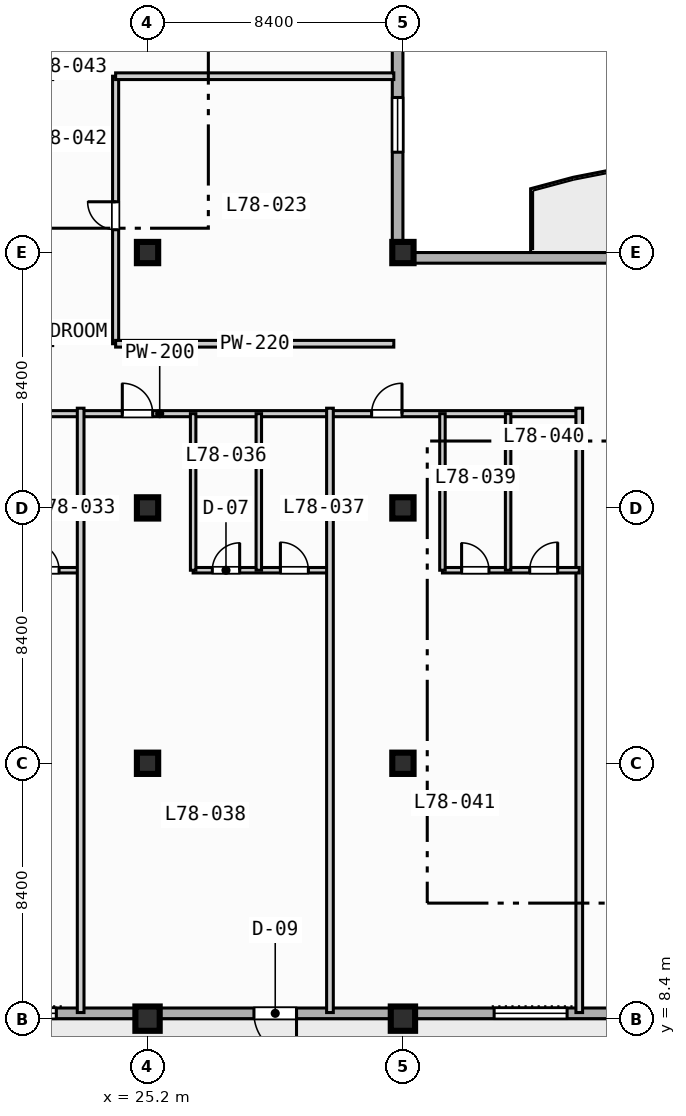
"""IFC4 building model, lengths in metres.
Left out: names, types, materials, properties, quantities, classifications, styles, units other than length and angle.
Written with IfcOpenShell. Run it as: python <this file> out.ifc"""

import sys

from ifc_helpers import new_model, si_unit, direction, frame, frame_2d, origin, origin_2d, place, context, subcontext, project, spatial, rectangle, extrude, element, fill, save


model = new_model("IFC4")
c1 = context("Model", 3, precision=1e-05, world=origin(), true_north=direction((0.0, 1.0)))
c2 = subcontext(c1, "Body", "Model", "MODEL_VIEW")
j1 = project(units=[si_unit("LENGTHUNIT", "METRE"), si_unit("PLANEANGLEUNIT", "RADIAN")], contexts=[c1])
p1 = place(None, origin())
s1 = spatial("IfcSite", under=j1, at=p1, CompositionType="ELEMENT")
p2 = place(p1, origin())
s2 = spatial("IfcBuilding", under=s1, at=p2, CompositionType="ELEMENT")
p3 = place(p2, frame((0.0, 0.0, 316.4)))
s3 = spatial("IfcBuildingStorey", under=s2, at=p3, CompositionType="ELEMENT", Elevation=316.4)
p4 = place(p3, frame((25.2, 8.4, 0.0), z_axis=(0.0, 0.0, 1.0), x_axis=(1.0, 0.0, 0.0)))
e1 = element("IfcColumn", 1, at=p4, inside=s3, PredefinedType="COLUMN", context=c2, shape_type="SweptSolid", body=[
    extrude(rectangle(XDim=0.8, YDim=0.8, at=origin_2d()), origin(), (0.0, 0.0, 1.0), 3.9),
])
for number, where, z_axis, x_axis in (
    (2, (25.2, 16.8, 0.0), (0.0, 0.0, 1.0), (1.0, 0.0, 0.0)),
    (3, (25.2, 25.2, 0.0), (0.0, 0.0, 1.0), (1.0, 0.0, 0.0)),
    (4, (25.2, 33.6, 0.0), (0.0, 0.0, 1.0), (1.0, 0.0, 0.0)),
):
    element("IfcColumn", number, at=place(p3, frame(where, z_axis=z_axis, x_axis=x_axis)), inside=s3, PredefinedType="COLUMN", context=c2, shape_type="SweptSolid", body=[
        extrude(rectangle(XDim=0.7, YDim=0.7, at=origin_2d()), origin(), (0.0, 0.0, 1.0), 3.9),
    ])
p5 = place(p3, frame((33.6, 8.4, 0.0), z_axis=(0.0, 0.0, 1.0), x_axis=(1.0, 0.0, 0.0)))
e5 = element("IfcColumn", 5, at=p5, inside=s3, PredefinedType="COLUMN", context=c2, shape_type="SweptSolid", body=[
    extrude(rectangle(XDim=0.8, YDim=0.8, at=origin_2d()), origin(), (0.0, 0.0, 1.0), 3.9),
])
for number, where, z_axis, x_axis in (
    (6, (33.6, 16.8, 0.0), (0.0, 0.0, 1.0), (1.0, 0.0, 0.0)),
    (7, (33.6, 25.2, 0.0), (0.0, 0.0, 1.0), (1.0, 0.0, 0.0)),
    (8, (33.6, 33.6, 0.0), (0.0, 0.0, 1.0), (1.0, 0.0, 0.0)),
):
    element("IfcColumn", number, at=place(p3, frame(where, z_axis=z_axis, x_axis=x_axis)), inside=s3, PredefinedType="COLUMN", context=c2, shape_type="SweptSolid", body=[
        extrude(rectangle(XDim=0.7, YDim=0.7, at=origin_2d()), origin(), (0.0, 0.0, 1.0), 3.9),
    ])
p6 = place(p3, frame((33.425, 72.425, 0.0), z_axis=(0.0, 0.0, 1.0), x_axis=(0.0, -1.0, 0.0)))
e9 = element("IfcWall", 9, at=p6, inside=s3, PredefinedType="STANDARD", context=c2, shape_type="SweptSolid", body=[
    extrude(rectangle(XDim=39.0, YDim=0.35, at=frame_2d((19.5, 0.0))), origin(), (0.0, 0.0, 1.0), 3.67),
])
p7 = place(p6, frame((33.725, 0.0, 0.85)))
e10 = element("IfcOpeningElement", 10, at=p7, cuts=e9, PredefinedType="OPENING", context=c2, shape_type="SweptSolid", body=[
    extrude(rectangle(XDim=1.8, YDim=1.8, at=frame_2d((0.9, 0.9))), frame((0.0, 0.185, 0.0), z_axis=(0.0, -1.0, 0.0), x_axis=(1.0, 0.0, 0.0)), (0.0, 0.0, 1.0), 0.37),
])
p8 = place(p6, frame((8.225, 0.0, 0.85)))
e11 = element("IfcOpeningElement", 11, at=p8, cuts=e9, PredefinedType="OPENING", context=c2, shape_type="SweptSolid", body=[
    extrude(rectangle(XDim=2.4, YDim=1.95, at=frame_2d((1.2, 0.975))), frame((0.0, 0.185, 0.0), z_axis=(0.0, -1.0, 0.0), x_axis=(1.0, 0.0, 0.0)), (0.0, 0.0, 1.0), 0.37),
])
p9 = place(p3, frame((33.425, 33.425, 0.0), z_axis=(0.0, 0.0, 1.0), x_axis=(1.0, 0.0, 0.0)))
e12 = element("IfcWall", 12, at=p9, inside=s3, PredefinedType="STANDARD", context=c2, shape_type="SweptSolid", body=[
    extrude(rectangle(XDim=30.6, YDim=0.35, at=frame_2d((15.3, 0.0))), origin(), (0.0, 0.0, 1.0), 3.67),
])
p10 = place(p9, frame((12.075, 0.0, 0.0)))
e13 = element("IfcOpeningElement", 13, at=p10, cuts=e12, PredefinedType="OPENING", context=c2, shape_type="SweptSolid", body=[
    extrude(rectangle(XDim=1.4, YDim=2.2, at=frame_2d((0.7, 1.1))), frame((0.0, 0.185, 0.0), z_axis=(0.0, -1.0, 0.0), x_axis=(1.0, 0.0, 0.0)), (0.0, 0.0, 1.0), 0.37),
])
p11 = place(p3, frame((64.025, 8.575, 0.0), z_axis=(0.0, 0.0, 1.0), x_axis=(-1.0, 0.0, 0.0)))
e14 = element("IfcWall", 14, at=p11, inside=s3, PredefinedType="STANDARD", context=c2, shape_type="SweptSolid", body=[
    extrude(rectangle(XDim=52.45, YDim=0.35, at=frame_2d((26.225, 0.0))), origin(), (0.0, 0.0, 1.0), 3.67),
])
p12 = place(p11, frame((33.925, 0.0, 0.0)))
e15 = element("IfcOpeningElement", 15, at=p12, cuts=e14, PredefinedType="OPENING", context=c2, shape_type="SweptSolid", body=[
    extrude(rectangle(XDim=1.4, YDim=2.2, at=frame_2d((0.7, 1.1))), frame((0.0, 0.185, 0.0), z_axis=(0.0, -1.0, 0.0), x_axis=(1.0, 0.0, 0.0)), (0.0, 0.0, 1.0), 0.37),
])
p13 = place(p11, frame((41.825, 0.0, 0.85)))
e16 = element("IfcOpeningElement", 16, at=p13, cuts=e14, PredefinedType="OPENING", context=c2, shape_type="SweptSolid", body=[
    extrude(rectangle(XDim=2.4, YDim=1.95, at=frame_2d((1.2, 0.975))), frame((0.0, 0.185, 0.0), z_axis=(0.0, -1.0, 0.0), x_axis=(1.0, 0.0, 0.0)), (0.0, 0.0, 1.0), 0.37),
])
p14 = place(p11, frame((25.025, 0.0, 0.85)))
e17 = element("IfcOpeningElement", 17, at=p14, cuts=e14, PredefinedType="OPENING", context=c2, shape_type="SweptSolid", body=[
    extrude(rectangle(XDim=2.4, YDim=1.95, at=frame_2d((1.2, 0.975))), frame((0.0, 0.185, 0.0), z_axis=(0.0, -1.0, 0.0), x_axis=(1.0, 0.0, 0.0)), (0.0, 0.0, 1.0), 0.37),
])
p15 = place(p11, frame((16.925, 0.0, 0.85)))
e18 = element("IfcOpeningElement", 18, at=p15, cuts=e14, PredefinedType="OPENING", context=c2, shape_type="SweptSolid", body=[
    extrude(rectangle(XDim=1.8, YDim=1.8, at=frame_2d((0.9, 0.9))), frame((0.0, 0.185, 0.0), z_axis=(0.0, -1.0, 0.0), x_axis=(1.0, 0.0, 0.0)), (0.0, 0.0, 1.0), 0.37),
])
p16 = place(p11, frame((50.275, 0.0, 0.85)))
e19 = element("IfcOpeningElement", 19, at=p16, cuts=e14, PredefinedType="OPENING", context=c2, shape_type="SweptSolid", body=[
    extrude(rectangle(XDim=1.8, YDim=1.8, at=frame_2d((0.9, 0.9))), frame((0.0, 0.185, 0.0), z_axis=(0.0, -1.0, 0.0), x_axis=(1.0, 0.0, 0.0)), (0.0, 0.0, 1.0), 0.37),
])
p17 = place(p3, frame((24.15, 30.6, 0.0), z_axis=(0.0, 0.0, 1.0), x_axis=(0.0, 1.0, 0.0)))
e20 = element("IfcWall", 20, at=p17, inside=s3, PredefinedType="PARTITIONING", context=c2, shape_type="SweptSolid", body=[
    extrude(rectangle(XDim=8.8, YDim=0.2, at=frame_2d((4.4, 0.0))), origin(), (0.0, 0.0, 1.0), 3.67),
])
p18 = place(p17, frame((3.75, 0.0, 0.0)))
e21 = element("IfcOpeningElement", 21, at=p18, cuts=e20, PredefinedType="OPENING", context=c2, shape_type="SweptSolid", body=[
    extrude(rectangle(XDim=0.92, YDim=2.1, at=frame_2d((0.46, 1.05))), frame((0.0, 0.11, 0.0), z_axis=(0.0, -1.0, 0.0), x_axis=(1.0, 0.0, 0.0)), (0.0, 0.0, 1.0), 0.22),
])
for number, where, z_axis, x_axis in (
    (22, (24.15, 30.6, 0.0), (0.0, 0.0, 1.0), (1.0, 0.0, 0.0)),
    (23, (24.15, 39.4, 0.0), (0.0, 0.0, 1.0), (1.0, 0.0, 0.0)),
):
    element("IfcWall", number, at=place(p3, frame(where, z_axis=z_axis, x_axis=x_axis)), inside=s3, PredefinedType="PARTITIONING", context=c2, shape_type="SweptSolid", body=[
        extrude(rectangle(XDim=9.15, YDim=0.22, at=frame_2d((4.575, 0.0))), origin(), (0.0, 0.0, 1.0), 3.67),
    ])
p19 = place(p3, frame((11.8, 28.3, 0.0), z_axis=(0.0, 0.0, 1.0), x_axis=(1.0, 0.0, 0.0)))
e24 = element("IfcWall", 24, at=p19, inside=s3, PredefinedType="PARTITIONING", context=c2, shape_type="SweptSolid", body=[
    extrude(rectangle(XDim=27.6, YDim=0.2, at=frame_2d((13.8, 0.0))), origin(), (0.0, 0.0, 1.0), 3.67),
])
p20 = place(p19, frame((3.92, 0.0, 0.0)))
e25 = element("IfcOpeningElement", 25, at=p20, cuts=e24, PredefinedType="OPENING", context=c2, shape_type="SweptSolid", body=[
    extrude(rectangle(XDim=1.0, YDim=2.15, at=frame_2d((0.5, 1.075))), frame((0.0, 0.11, 0.0), z_axis=(0.0, -1.0, 0.0), x_axis=(1.0, 0.0, 0.0)), (0.0, 0.0, 1.0), 0.22),
])
p21 = place(p19, frame((12.57, 0.0, 0.0)))
e26 = element("IfcOpeningElement", 26, at=p21, cuts=e24, PredefinedType="OPENING", context=c2, shape_type="SweptSolid", body=[
    extrude(rectangle(XDim=1.0, YDim=2.15, at=frame_2d((0.5, 1.075))), frame((0.0, 0.11, 0.0), z_axis=(0.0, -1.0, 0.0), x_axis=(1.0, 0.0, 0.0)), (0.0, 0.0, 1.0), 0.22),
])
p22 = place(p19, frame((20.77, 0.0, 0.0)))
e27 = element("IfcOpeningElement", 27, at=p22, cuts=e24, PredefinedType="OPENING", context=c2, shape_type="SweptSolid", body=[
    extrude(rectangle(XDim=1.0, YDim=2.15, at=frame_2d((0.5, 1.075))), frame((0.0, 0.11, 0.0), z_axis=(0.0, -1.0, 0.0), x_axis=(1.0, 0.0, 0.0)), (0.0, 0.0, 1.0), 0.22),
])
p23 = place(p3, frame((18.5, 23.15, 0.0), z_axis=(0.0, 0.0, 1.0), x_axis=(1.0, 0.0, 0.0)))
e28 = element("IfcWall", 28, at=p23, inside=s3, PredefinedType="PLUMBINGWALL", context=c2, shape_type="SweptSolid", body=[
    extrude(rectangle(XDim=4.5, YDim=0.18, at=frame_2d((2.25, 0.0))), origin(), (0.0, 0.0, 1.0), 3.67),
])
p24 = place(p23, frame((0.63, 0.0, 0.0)))
e29 = element("IfcOpeningElement", 29, at=p24, cuts=e28, PredefinedType="OPENING", context=c2, shape_type="SweptSolid", body=[
    extrude(rectangle(XDim=0.9, YDim=2.1, at=frame_2d((0.45, 1.05))), frame((0.0, 0.1, 0.0), z_axis=(0.0, -1.0, 0.0), x_axis=(1.0, 0.0, 0.0)), (0.0, 0.0, 1.0), 0.2),
])
p25 = place(p23, frame((2.87, 0.0, 0.0)))
e30 = element("IfcOpeningElement", 30, at=p25, cuts=e28, PredefinedType="OPENING", context=c2, shape_type="SweptSolid", body=[
    extrude(rectangle(XDim=0.92, YDim=2.1, at=frame_2d((0.46, 1.05))), frame((0.0, 0.1, 0.0), z_axis=(0.0, -1.0, 0.0), x_axis=(1.0, 0.0, 0.0)), (0.0, 0.0, 1.0), 0.2),
])
p26 = place(p3, frame((23.0, 8.6, 0.0), z_axis=(0.0, 0.0, 1.0), x_axis=(0.0, 1.0, 0.0)))
e31 = element("IfcWall", 31, at=p26, inside=s3, PredefinedType="PARTITIONING", context=c2, shape_type="SweptSolid", body=[
    extrude(rectangle(XDim=19.88, YDim=0.22, at=frame_2d((9.94, 0.0))), origin(), (0.0, 0.0, 1.0), 3.67),
])
p27 = place(p3, frame((26.7, 23.15, 0.0), z_axis=(0.0, 0.0, 1.0), x_axis=(1.0, 0.0, 0.0)))
e32 = element("IfcWall", 32, at=p27, inside=s3, PredefinedType="PLUMBINGWALL", context=c2, shape_type="SweptSolid", body=[
    extrude(rectangle(XDim=4.5, YDim=0.18, at=frame_2d((2.25, 0.0))), origin(), (0.0, 0.0, 1.0), 3.67),
])
p28 = place(p27, frame((0.63, 0.0, 0.0)))
e33 = element("IfcOpeningElement", 33, at=p28, cuts=e32, PredefinedType="OPENING", context=c2, shape_type="SweptSolid", body=[
    extrude(rectangle(XDim=0.9, YDim=2.1, at=frame_2d((0.45, 1.05))), frame((0.0, 0.1, 0.0), z_axis=(0.0, -1.0, 0.0), x_axis=(1.0, 0.0, 0.0)), (0.0, 0.0, 1.0), 0.2),
])
p29 = place(p27, frame((2.87, 0.0, 0.0)))
e34 = element("IfcOpeningElement", 34, at=p29, cuts=e32, PredefinedType="OPENING", context=c2, shape_type="SweptSolid", body=[
    extrude(rectangle(XDim=0.92, YDim=2.1, at=frame_2d((0.46, 1.05))), frame((0.0, 0.1, 0.0), z_axis=(0.0, -1.0, 0.0), x_axis=(1.0, 0.0, 0.0)), (0.0, 0.0, 1.0), 0.2),
])
for number, where, z_axis, x_axis in (
    (35, (26.7, 23.15, 0.0), (0.0, 0.0, 1.0), (0.0, 1.0, 0.0)),
    (36, (28.86, 23.15, 0.0), (0.0, 0.0, 1.0), (0.0, 1.0, 0.0)),
):
    element("IfcWall", number, at=place(p3, frame(where, z_axis=z_axis, x_axis=x_axis)), inside=s3, PredefinedType="PLUMBINGWALL", context=c2, shape_type="SweptSolid", body=[
        extrude(rectangle(XDim=5.15, YDim=0.18, at=frame_2d((2.575, 0.0))), origin(), (0.0, 0.0, 1.0), 3.67),
    ])
for number, where, z_axis, x_axis in (
    (37, (31.2, 8.6, 0.0), (0.0, 0.0, 1.0), (0.0, 1.0, 0.0)),
    (38, (39.4, 8.6, 0.0), (0.0, 0.0, 1.0), (0.0, 1.0, 0.0)),
):
    element("IfcWall", number, at=place(p3, frame(where, z_axis=z_axis, x_axis=x_axis)), inside=s3, PredefinedType="PARTITIONING", context=c2, shape_type="SweptSolid", body=[
        extrude(rectangle(XDim=19.88, YDim=0.22, at=frame_2d((9.94, 0.0))), origin(), (0.0, 0.0, 1.0), 3.67),
    ])
p30 = place(p3, frame((34.9, 23.15, 0.0), z_axis=(0.0, 0.0, 1.0), x_axis=(1.0, 0.0, 0.0)))
e39 = element("IfcWall", 39, at=p30, inside=s3, PredefinedType="PLUMBINGWALL", context=c2, shape_type="SweptSolid", body=[
    extrude(rectangle(XDim=4.5, YDim=0.18, at=frame_2d((2.25, 0.0))), origin(), (0.0, 0.0, 1.0), 3.67),
])
p31 = place(p30, frame((0.63, 0.0, 0.0)))
e40 = element("IfcOpeningElement", 40, at=p31, cuts=e39, PredefinedType="OPENING", context=c2, shape_type="SweptSolid", body=[
    extrude(rectangle(XDim=0.9, YDim=2.1, at=frame_2d((0.45, 1.05))), frame((0.0, 0.1, 0.0), z_axis=(0.0, -1.0, 0.0), x_axis=(1.0, 0.0, 0.0)), (0.0, 0.0, 1.0), 0.2),
])
p32 = place(p30, frame((2.87, 0.0, 0.0)))
e41 = element("IfcOpeningElement", 41, at=p32, cuts=e39, PredefinedType="OPENING", context=c2, shape_type="SweptSolid", body=[
    extrude(rectangle(XDim=0.92, YDim=2.1, at=frame_2d((0.46, 1.05))), frame((0.0, 0.1, 0.0), z_axis=(0.0, -1.0, 0.0), x_axis=(1.0, 0.0, 0.0)), (0.0, 0.0, 1.0), 0.2),
])
for number, where, z_axis, x_axis in (
    (42, (34.9, 23.15, 0.0), (0.0, 0.0, 1.0), (0.0, 1.0, 0.0)),
    (43, (37.06, 23.15, 0.0), (0.0, 0.0, 1.0), (0.0, 1.0, 0.0)),
):
    element("IfcWall", number, at=place(p3, frame(where, z_axis=z_axis, x_axis=x_axis)), inside=s3, PredefinedType="PLUMBINGWALL", context=c2, shape_type="SweptSolid", body=[
        extrude(rectangle(XDim=5.15, YDim=0.18, at=frame_2d((2.575, 0.0))), origin(), (0.0, 0.0, 1.0), 3.67),
    ])
p33 = place(p7, origin())
e44 = element("IfcWindow", 44, at=p33, inside=s3, PartitioningType="SINGLE_PANEL", PredefinedType="WINDOW", context=c2, shape_type="SweptSolid", body=[
    extrude(rectangle(XDim=1.8, YDim=1.8, at=frame_2d((0.9, 0.9))), frame((0.0, 0.03, 0.0), z_axis=(0.0, -1.0, 0.0), x_axis=(1.0, 0.0, 0.0)), (0.0, 0.0, 1.0), 0.06),
])
fill(e10, e44)
p34 = place(p12, origin())
e45 = element("IfcDoor", 45, at=p34, inside=s3, OperationType="SINGLE_SWING_LEFT", PredefinedType="DOOR", context=c2, shape_type="SweptSolid", body=[
    extrude(rectangle(XDim=1.4, YDim=2.2, at=frame_2d((0.7, 1.1))), frame((0.0, 0.025, 0.0), z_axis=(0.0, -1.0, 0.0), x_axis=(1.0, 0.0, 0.0)), (0.0, 0.0, 1.0), 0.05),
])
fill(e15, e45)
p35 = place(p13, origin())
e46 = element("IfcWindow", 46, at=p35, inside=s3, PartitioningType="SINGLE_PANEL", PredefinedType="WINDOW", context=c2, shape_type="SweptSolid", body=[
    extrude(rectangle(XDim=2.4, YDim=1.95, at=frame_2d((1.2, 0.975))), frame((0.0, 0.03, 0.0), z_axis=(0.0, -1.0, 0.0), x_axis=(1.0, 0.0, 0.0)), (0.0, 0.0, 1.0), 0.06),
])
fill(e16, e46)
p36 = place(p14, origin())
e47 = element("IfcWindow", 47, at=p36, inside=s3, PartitioningType="SINGLE_PANEL", PredefinedType="WINDOW", context=c2, shape_type="SweptSolid", body=[
    extrude(rectangle(XDim=2.4, YDim=1.95, at=frame_2d((1.2, 0.975))), frame((0.0, 0.03, 0.0), z_axis=(0.0, -1.0, 0.0), x_axis=(1.0, 0.0, 0.0)), (0.0, 0.0, 1.0), 0.06),
])
fill(e17, e47)
p37 = place(p18, origin())
e48 = element("IfcDoor", 48, at=p37, inside=s3, OperationType="SINGLE_SWING_RIGHT", PredefinedType="DOOR", context=c2, shape_type="SweptSolid", body=[
    extrude(rectangle(XDim=0.92, YDim=2.1, at=frame_2d((0.46, 1.05))), frame((0.0, 0.025, 0.0), z_axis=(0.0, -1.0, 0.0), x_axis=(1.0, 0.0, 0.0)), (0.0, 0.0, 1.0), 0.05),
])
fill(e21, e48)
p38 = place(p21, origin())
e49 = element("IfcDoor", 49, at=p38, inside=s3, OperationType="SINGLE_SWING_LEFT", PredefinedType="DOOR", context=c2, shape_type="SweptSolid", body=[
    extrude(rectangle(XDim=1.0, YDim=2.15, at=frame_2d((0.5, 1.075))), frame((0.0, 0.025, 0.0), z_axis=(0.0, -1.0, 0.0), x_axis=(1.0, 0.0, 0.0)), (0.0, 0.0, 1.0), 0.05),
])
fill(e26, e49)
p39 = place(p22, origin())
e50 = element("IfcDoor", 50, at=p39, inside=s3, OperationType="SINGLE_SWING_RIGHT", PredefinedType="DOOR", context=c2, shape_type="SweptSolid", body=[
    extrude(rectangle(XDim=1.0, YDim=2.15, at=frame_2d((0.5, 1.075))), frame((0.0, 0.025, 0.0), z_axis=(0.0, -1.0, 0.0), x_axis=(1.0, 0.0, 0.0)), (0.0, 0.0, 1.0), 0.05),
])
fill(e27, e50)
p40 = place(p25, origin())
e51 = element("IfcDoor", 51, at=p40, inside=s3, OperationType="SINGLE_SWING_LEFT", PredefinedType="DOOR", context=c2, shape_type="SweptSolid", body=[
    extrude(rectangle(XDim=0.92, YDim=2.1, at=frame_2d((0.46, 1.05))), frame((0.0, 0.025, 0.0), z_axis=(0.0, -1.0, 0.0), x_axis=(1.0, 0.0, 0.0)), (0.0, 0.0, 1.0), 0.05),
])
fill(e30, e51)
p41 = place(p28, origin())
e52 = element("IfcDoor", 52, at=p41, inside=s3, OperationType="SINGLE_SWING_RIGHT", PredefinedType="DOOR", context=c2, shape_type="SweptSolid", body=[
    extrude(rectangle(XDim=0.9, YDim=2.1, at=frame_2d((0.45, 1.05))), frame((0.0, 0.025, 0.0), z_axis=(0.0, -1.0, 0.0), x_axis=(1.0, 0.0, 0.0)), (0.0, 0.0, 1.0), 0.05),
])
fill(e33, e52)
p42 = place(p29, origin())
e53 = element("IfcDoor", 53, at=p42, inside=s3, OperationType="SINGLE_SWING_LEFT", PredefinedType="DOOR", context=c2, shape_type="SweptSolid", body=[
    extrude(rectangle(XDim=0.92, YDim=2.1, at=frame_2d((0.46, 1.05))), frame((0.0, 0.025, 0.0), z_axis=(0.0, -1.0, 0.0), x_axis=(1.0, 0.0, 0.0)), (0.0, 0.0, 1.0), 0.05),
])
fill(e34, e53)
p43 = place(p31, origin())
e54 = element("IfcDoor", 54, at=p43, inside=s3, OperationType="SINGLE_SWING_LEFT", PredefinedType="DOOR", context=c2, shape_type="SweptSolid", body=[
    extrude(rectangle(XDim=0.9, YDim=2.1, at=frame_2d((0.45, 1.05))), frame((0.0, 0.025, 0.0), z_axis=(0.0, -1.0, 0.0), x_axis=(1.0, 0.0, 0.0)), (0.0, 0.0, 1.0), 0.05),
])
fill(e40, e54)
p44 = place(p32, origin())
e55 = element("IfcDoor", 55, at=p44, inside=s3, OperationType="SINGLE_SWING_RIGHT", PredefinedType="DOOR", context=c2, shape_type="SweptSolid", body=[
    extrude(rectangle(XDim=0.92, YDim=2.1, at=frame_2d((0.46, 1.05))), frame((0.0, 0.025, 0.0), z_axis=(0.0, -1.0, 0.0), x_axis=(1.0, 0.0, 0.0)), (0.0, 0.0, 1.0), 0.05),
])
fill(e41, e55)
save(model, sys.argv[1])
